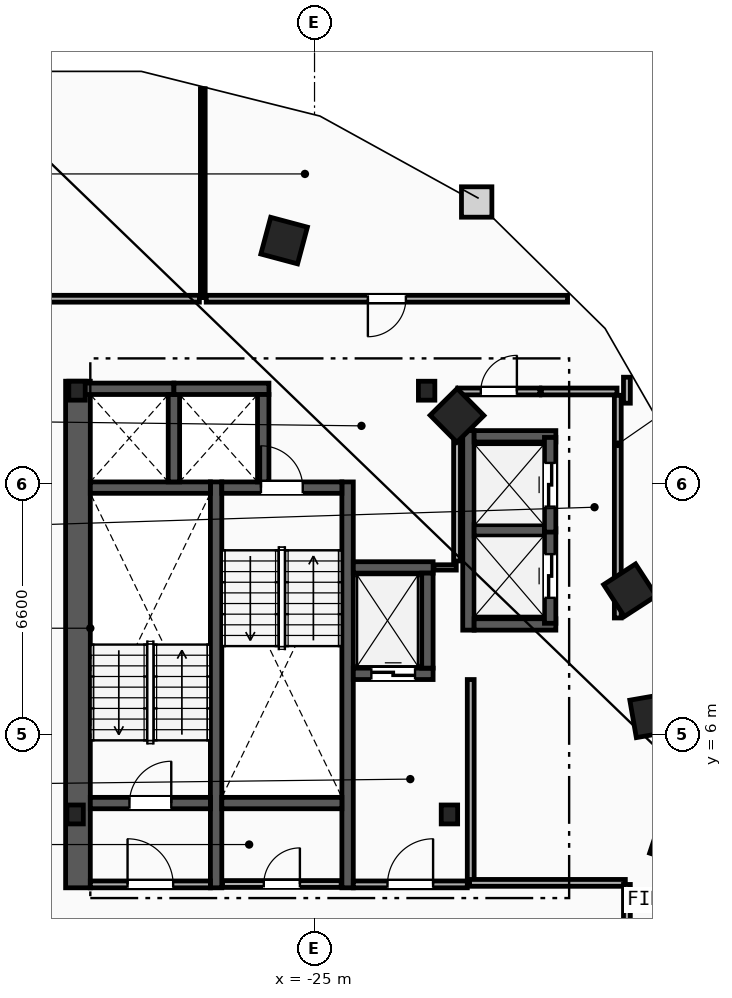
"""IFC4 building model, lengths in metres.
Left out: names, types, materials, properties, quantities, classifications, styles, units other than length and angle.
Written with IfcOpenShell. Run it as: python <this file> out.ifc"""

import sys

from ifc_helpers import new_model, si_unit, direction, frame, frame_2d, origin, origin_2d, place, context, subcontext, project, spatial, rectangle, i_section, extrude, element, fill, save


model = new_model("IFC4")
c1 = context("Model", 3, precision=1e-05, world=origin(), true_north=direction((0.0, 1.0)))
c2 = subcontext(c1, "Body", "Model", "MODEL_VIEW")
j1 = project(units=[si_unit("LENGTHUNIT", "METRE"), si_unit("PLANEANGLEUNIT", "RADIAN")], contexts=[c1])
p1 = place(None, origin())
s1 = spatial("IfcSite", under=j1, at=p1, CompositionType="ELEMENT")
p2 = place(p1, origin())
s2 = spatial("IfcBuilding", under=s1, at=p2, CompositionType="ELEMENT")
p3 = place(p2, frame((0.0, 0.0, 180.0)))
s3 = spatial("IfcBuildingStorey", under=s2, at=p3, CompositionType="ELEMENT", Elevation=180.0)
for number, where, z_axis, x_axis in (
    (1, (-31.3, 3.9, 0.0), (0.0, 0.0, 1.0), (1.0, 0.0, 0.0)),
    (2, (-21.45, 3.9, 0.0), (0.0, 0.0, 1.0), (1.0, 0.0, 0.0)),
    (3, (-22.05, 15.05, 0.0), (0.0, 0.0, 1.0), (1.0, 0.0, 0.0)),
    (4, (-31.25, 15.05, 0.0), (0.0, 0.0, 1.0), (1.0, 0.0, 0.0)),
):
    element("IfcColumn", number, at=place(p3, frame(where, z_axis=z_axis, x_axis=x_axis)), inside=s3, PredefinedType="COLUMN", context=c2, shape_type="SweptSolid", body=[
        extrude(i_section(OverallWidth=0.432, OverallDepth=0.498, WebThickness=0.056, FlangeThickness=0.089, FilletRadius=0.018, at=origin_2d()), origin(), (0.0, 0.0, 1.0), 3.6),
    ])
for number, where, z_axis, x_axis in (
    (5, (-15.55, 3.2, 0.0), (0.0, 0.0, 1.0), (0.315, 0.949, 0.0)),
    (6, (-16.125, 6.5, 0.0), (0.0, 0.0, 1.0), (-0.172, 0.985, 0.0)),
    (7, (-16.7, 9.8, 0.0), (0.0, 0.0, 1.0), (-0.544, 0.839, 0.0)),
    (8, (-21.25, 14.4, 0.0), (0.0, 0.0, 1.0), (-0.703, 0.711, 0.0)),
    (9, (-25.8, 19.0, 0.0), (0.0, 0.0, 1.0), (-0.966, 0.259, 0.0)),
):
    element("IfcColumn", number, at=place(p3, frame(where, z_axis=z_axis, x_axis=x_axis)), inside=s3, PredefinedType="COLUMN", context=c2, shape_type="SweptSolid", body=[
        extrude(rectangle(XDim=1.0, YDim=1.0, at=origin_2d()), origin(), (0.0, 0.0, 1.0), 3.6),
    ])
p4 = place(p3, frame((-31.225, 1.97, 0.0), z_axis=(0.0, 0.0, 1.0), x_axis=(0.0, 1.0, 0.0)))
e10 = element("IfcWall", 10, at=p4, inside=s3, PredefinedType="SHEAR", context=c2, shape_type="SweptSolid", body=[
    extrude(rectangle(XDim=13.33, YDim=0.65, at=frame_2d((6.665, 0.0))), origin(), (0.0, 0.0, 1.0), 3.36),
])
for number, where, z_axis, x_axis in (
    (11, (-27.59, 1.97, 0.0), (0.0, 0.0, 1.0), (0.0, 1.0, 0.0)),
    (12, (-24.13, 1.97, 0.0), (0.0, 0.0, 1.0), (0.0, 1.0, 0.0)),
):
    element("IfcWall", number, at=place(p3, frame(where, z_axis=z_axis, x_axis=x_axis)), inside=s3, PredefinedType="SHEAR", context=c2, shape_type="SweptSolid", body=[
        extrude(rectangle(XDim=10.68, YDim=0.3, at=frame_2d((5.34, 0.0))), origin(), (0.0, 0.0, 1.0), 3.36),
    ])
p5 = place(p3, frame((-30.9, 4.2, 0.0), z_axis=(0.0, 0.0, 1.0), x_axis=(1.0, 0.0, 0.0)))
e13 = element("IfcWall", 13, at=p5, inside=s3, PredefinedType="SHEAR", context=c2, shape_type="SweptSolid", body=[
    extrude(rectangle(XDim=3.16, YDim=0.3, at=frame_2d((1.58, 0.0))), origin(), (0.0, 0.0, 1.0), 3.36),
])
p6 = place(p5, frame((1.03, 0.0, 0.0)))
e14 = element("IfcOpeningElement", 14, at=p6, cuts=e13, PredefinedType="OPENING", context=c2, shape_type="SweptSolid", body=[
    extrude(rectangle(XDim=1.1, YDim=2.15, at=frame_2d((0.55, 1.075))), frame((0.0, 0.16, 0.0), z_axis=(0.0, -1.0, 0.0), x_axis=(1.0, 0.0, 0.0)), (0.0, 0.0, 1.0), 0.32),
])
p7 = place(p3, frame((-30.9, 12.5, 0.0), z_axis=(0.0, 0.0, 1.0), x_axis=(1.0, 0.0, 0.0)))
e15 = element("IfcWall", 15, at=p7, inside=s3, PredefinedType="SHEAR", context=c2, shape_type="SweptSolid", body=[
    extrude(rectangle(XDim=3.16, YDim=0.3, at=frame_2d((1.58, 0.0))), origin(), (0.0, 0.0, 1.0), 3.36),
])
p8 = place(p3, frame((-27.44, 12.5, 0.0), z_axis=(0.0, 0.0, 1.0), x_axis=(1.0, 0.0, 0.0)))
e16 = element("IfcWall", 16, at=p8, inside=s3, PredefinedType="SHEAR", context=c2, shape_type="SweptSolid", body=[
    extrude(rectangle(XDim=3.16, YDim=0.3, at=frame_2d((1.58, 0.0))), origin(), (0.0, 0.0, 1.0), 3.36),
])
p9 = place(p8, frame((1.03, 0.0, 0.0)))
e17 = element("IfcOpeningElement", 17, at=p9, cuts=e16, PredefinedType="OPENING", context=c2, shape_type="SweptSolid", body=[
    extrude(rectangle(XDim=1.1, YDim=2.15, at=frame_2d((0.55, 1.075))), frame((0.0, 0.16, 0.0), z_axis=(0.0, -1.0, 0.0), x_axis=(1.0, 0.0, 0.0)), (0.0, 0.0, 1.0), 0.32),
])
p10 = place(p3, frame((-27.44, 4.2, 0.0), z_axis=(0.0, 0.0, 1.0), x_axis=(1.0, 0.0, 0.0)))
e18 = element("IfcWall", 18, at=p10, inside=s3, PredefinedType="SHEAR", context=c2, shape_type="SweptSolid", body=[
    extrude(rectangle(XDim=3.16, YDim=0.3, at=frame_2d((1.58, 0.0))), origin(), (0.0, 0.0, 1.0), 3.36),
])
p11 = place(p3, frame((-20.89, 2.15, 0.0), z_axis=(0.0, 0.0, 1.0), x_axis=(0.0, 1.0, 0.0)))
e19 = element("IfcWall", 19, at=p11, inside=s3, PredefinedType="PARTITIONING", context=c2, shape_type="SweptSolid", body=[
    extrude(rectangle(XDim=5.3, YDim=0.18, at=frame_2d((2.65, 0.0))), origin(), (0.0, 0.0, 1.0), 3.36),
])
p12 = place(p3, frame((-23.98, 2.06, 0.0), z_axis=(0.0, 0.0, 1.0), x_axis=(1.0, 0.0, 0.0)))
e20 = element("IfcWall", 20, at=p12, inside=s3, PredefinedType="PARTITIONING", context=c2, shape_type="SweptSolid", body=[
    extrude(rectangle(XDim=3.0, YDim=0.18, at=frame_2d((1.5, 0.0))), origin(), (0.0, 0.0, 1.0), 3.36),
])
p13 = place(p12, frame((0.9, 0.0, 0.0)))
e21 = element("IfcOpeningElement", 21, at=p13, cuts=e20, PredefinedType="OPENING", context=c2, shape_type="SweptSolid", body=[
    extrude(rectangle(XDim=1.2, YDim=2.15, at=frame_2d((0.6, 1.075))), frame((0.0, 0.1, 0.0), z_axis=(0.0, -1.0, 0.0), x_axis=(1.0, 0.0, 0.0)), (0.0, 0.0, 1.0), 0.2),
])
p14 = place(p3, frame((-30.9, 2.06, 0.0), z_axis=(0.0, 0.0, 1.0), x_axis=(1.0, 0.0, 0.0)))
e22 = element("IfcWall", 22, at=p14, inside=s3, PredefinedType="PARTITIONING", context=c2, shape_type="SweptSolid", body=[
    extrude(rectangle(XDim=3.16, YDim=0.18, at=frame_2d((1.58, 0.0))), origin(), (0.0, 0.0, 1.0), 3.36),
])
p15 = place(p14, frame((0.98, 0.0, 0.0)))
e23 = element("IfcOpeningElement", 23, at=p15, cuts=e22, PredefinedType="OPENING", context=c2, shape_type="SweptSolid", body=[
    extrude(rectangle(XDim=1.2, YDim=2.15, at=frame_2d((0.6, 1.075))), frame((0.0, 0.1, 0.0), z_axis=(0.0, -1.0, 0.0), x_axis=(1.0, 0.0, 0.0)), (0.0, 0.0, 1.0), 0.2),
])
p16 = place(p3, frame((-23.98, 7.6, 0.0), z_axis=(0.0, 0.0, 1.0), x_axis=(1.0, 0.0, 0.0)))
e24 = element("IfcWall", 24, at=p16, inside=s3, PredefinedType="SHEAR", context=c2, shape_type="SweptSolid", body=[
    extrude(rectangle(XDim=2.1, YDim=0.3, at=frame_2d((1.05, 0.0))), origin(), (0.0, 0.0, 1.0), 3.36),
])
p17 = place(p16, frame((0.475, 0.0, 0.0)))
e25 = element("IfcOpeningElement", 25, at=p17, cuts=e24, PredefinedType="OPENING", context=c2, shape_type="SweptSolid", body=[
    extrude(rectangle(XDim=1.15, YDim=2.2, at=frame_2d((0.575, 1.1))), frame((0.0, 0.16, 0.0), z_axis=(0.0, -1.0, 0.0), x_axis=(1.0, 0.0, 0.0)), (0.0, 0.0, 1.0), 0.32),
])
p18 = place(p3, frame((-23.98, 10.4, 0.0), z_axis=(0.0, 0.0, 1.0), x_axis=(1.0, 0.0, 0.0)))
e26 = element("IfcWall", 26, at=p18, inside=s3, PredefinedType="SHEAR", context=c2, shape_type="SweptSolid", body=[
    extrude(rectangle(XDim=2.1, YDim=0.3, at=frame_2d((1.05, 0.0))), origin(), (0.0, 0.0, 1.0), 3.36),
])
for number, where, z_axis, x_axis in (
    (27, (-22.03, 7.75, 0.0), (0.0, 0.0, 1.0), (0.0, 1.0, 0.0)),
    (28, (-31.2, 15.1, 0.0), (0.0, 0.0, 1.0), (1.0, 0.0, 0.0)),
):
    element("IfcWall", number, at=place(p3, frame(where, z_axis=z_axis, x_axis=x_axis)), inside=s3, PredefinedType="SHEAR", context=c2, shape_type="SweptSolid", body=[
        extrude(rectangle(XDim=2.5, YDim=0.3, at=frame_2d((1.25, 0.0))), origin(), (0.0, 0.0, 1.0), 3.36),
    ])
p19 = place(p3, frame((-28.7, 12.65, 0.0), z_axis=(0.0, 0.0, 1.0), x_axis=(0.0, 1.0, 0.0)))
e29 = element("IfcWall", 29, at=p19, inside=s3, PredefinedType="SHEAR", context=c2, shape_type="SweptSolid", body=[
    extrude(rectangle(XDim=2.3, YDim=0.3, at=frame_2d((1.15, 0.0))), origin(), (0.0, 0.0, 1.0), 3.36),
])
p20 = place(p3, frame((-28.7, 15.1, 0.0), z_axis=(0.0, 0.0, 1.0), x_axis=(1.0, 0.0, 0.0)))
e30 = element("IfcWall", 30, at=p20, inside=s3, PredefinedType="SHEAR", context=c2, shape_type="SweptSolid", body=[
    extrude(rectangle(XDim=2.5, YDim=0.3, at=frame_2d((1.25, 0.0))), origin(), (0.0, 0.0, 1.0), 3.36),
])
p21 = place(p3, frame((-26.35, 12.65, 0.0), z_axis=(0.0, 0.0, 1.0), x_axis=(0.0, 1.0, 0.0)))
e31 = element("IfcWall", 31, at=p21, inside=s3, PredefinedType="SHEAR", context=c2, shape_type="SweptSolid", body=[
    extrude(rectangle(XDim=2.3, YDim=0.3, at=frame_2d((1.15, 0.0))), origin(), (0.0, 0.0, 1.0), 3.36),
])
p22 = place(p3, frame((-20.95, 8.75, 0.0), z_axis=(0.0, 0.0, 1.0), x_axis=(0.0, 1.0, 0.0)))
e32 = element("IfcWall", 32, at=p22, inside=s3, PredefinedType="SHEAR", context=c2, shape_type="SweptSolid", body=[
    extrude(rectangle(XDim=5.25, YDim=0.3, at=frame_2d((2.625, 0.0))), origin(), (0.0, 0.0, 1.0), 3.36),
])
for number, where, z_axis, x_axis in (
    (33, (-20.8, 8.9, 0.0), (0.0, 0.0, 1.0), (1.0, 0.0, 0.0)),
    (34, (-20.8, 13.85, 0.0), (0.0, 0.0, 1.0), (1.0, 0.0, 0.0)),
):
    element("IfcWall", number, at=place(p3, frame(where, z_axis=z_axis, x_axis=x_axis)), inside=s3, PredefinedType="SHEAR", context=c2, shape_type="SweptSolid", body=[
        extrude(rectangle(XDim=2.15, YDim=0.3, at=frame_2d((1.075, 0.0))), origin(), (0.0, 0.0, 1.0), 3.36),
    ])
p23 = place(p3, frame((-20.8, 11.375, 0.0), z_axis=(0.0, 0.0, 1.0), x_axis=(1.0, 0.0, 0.0)))
e35 = element("IfcWall", 35, at=p23, inside=s3, PredefinedType="SHEAR", context=c2, shape_type="SweptSolid", body=[
    extrude(rectangle(XDim=1.85, YDim=0.3, at=frame_2d((0.925, 0.0))), origin(), (0.0, 0.0, 1.0), 3.36),
])
p24 = place(p3, frame((-18.8, 8.93, 0.0), z_axis=(0.0, 0.0, 1.0), x_axis=(0.0, 1.0, 0.0)))
e36 = element("IfcWall", 36, at=p24, inside=s3, PredefinedType="SHEAR", context=c2, shape_type="SweptSolid", body=[
    extrude(rectangle(XDim=2.49, YDim=0.3, at=frame_2d((1.245, 0.0))), origin(), (0.0, 0.0, 1.0), 3.36),
])
p25 = place(p24, frame((0.67, 0.0, 0.0)))
e37 = element("IfcOpeningElement", 37, at=p25, cuts=e36, PredefinedType="OPENING", context=c2, shape_type="SweptSolid", body=[
    extrude(rectangle(XDim=1.15, YDim=2.2, at=frame_2d((0.575, 1.1))), frame((0.0, 0.16, 0.0), z_axis=(0.0, -1.0, 0.0), x_axis=(1.0, 0.0, 0.0)), (0.0, 0.0, 1.0), 0.32),
])
p26 = place(p3, frame((-18.8, 11.33, 0.0), z_axis=(0.0, 0.0, 1.0), x_axis=(0.0, 1.0, 0.0)))
e38 = element("IfcWall", 38, at=p26, inside=s3, PredefinedType="SHEAR", context=c2, shape_type="SweptSolid", body=[
    extrude(rectangle(XDim=2.49, YDim=0.3, at=frame_2d((1.245, 0.0))), origin(), (0.0, 0.0, 1.0), 3.36),
])
p27 = place(p26, frame((0.67, 0.0, 0.0)))
e39 = element("IfcOpeningElement", 39, at=p27, cuts=e38, PredefinedType="OPENING", context=c2, shape_type="SweptSolid", body=[
    extrude(rectangle(XDim=1.15, YDim=2.2, at=frame_2d((0.575, 1.1))), frame((0.0, 0.16, 0.0), z_axis=(0.0, -1.0, 0.0), x_axis=(1.0, 0.0, 0.0)), (0.0, 0.0, 1.0), 0.32),
])
p28 = place(p3, frame((-17.02, 9.07, 0.0), z_axis=(0.0, 0.0, 1.0), x_axis=(0.0, 1.0, 0.0)))
e40 = element("IfcWall", 40, at=p28, inside=s3, PredefinedType="PARTITIONING", context=c2, shape_type="SweptSolid", body=[
    extrude(rectangle(XDim=5.86, YDim=0.18, at=frame_2d((2.93, 0.0))), origin(), (0.0, 0.0, 1.0), 3.36),
])
p29 = place(p3, frame((-21.23, 15.03, 0.0), z_axis=(0.0, 0.0, 1.0), x_axis=(1.0, 0.0, 0.0)))
e41 = element("IfcWall", 41, at=p29, inside=s3, PredefinedType="PARTITIONING", context=c2, shape_type="SweptSolid", body=[
    extrude(rectangle(XDim=2.16, YDim=0.18, at=frame_2d((1.08, 0.0))), origin(), (0.0, 0.0, 1.0), 3.36),
])
p30 = place(p29, frame((0.605, 0.0, 0.0)))
e42 = element("IfcOpeningElement", 42, at=p30, cuts=e41, PredefinedType="OPENING", context=c2, shape_type="SweptSolid", body=[
    extrude(rectangle(XDim=0.95, YDim=2.1, at=frame_2d((0.475, 1.05))), frame((0.0, 0.1, 0.0), z_axis=(0.0, -1.0, 0.0), x_axis=(1.0, 0.0, 0.0)), (0.0, 0.0, 1.0), 0.2),
])
p31 = place(p3, frame((-19.03, 15.03, 0.0), z_axis=(0.0, 0.0, 1.0), x_axis=(1.0, 0.0, 0.0)))
e43 = element("IfcWall", 43, at=p31, inside=s3, PredefinedType="PARTITIONING", context=c2, shape_type="SweptSolid", body=[
    extrude(rectangle(XDim=1.99, YDim=0.18, at=frame_2d((0.995, 0.0))), origin(), (0.0, 0.0, 1.0), 3.36),
])
p32 = place(p3, frame((-21.86, 10.4, 0.0), z_axis=(0.0, 0.0, 1.0), x_axis=(1.0, 0.0, 0.0)))
e44 = element("IfcWall", 44, at=p32, inside=s3, PredefinedType="PARTITIONING", context=c2, shape_type="SweptSolid", body=[
    extrude(rectangle(XDim=0.59, YDim=0.14, at=frame_2d((0.295, 0.0))), origin(), (0.0, 0.0, 1.0), 3.36),
])
p33 = place(p3, frame((-21.25, 10.57, 0.0), z_axis=(0.0, 0.0, 1.0), x_axis=(0.0, 1.0, 0.0)))
e45 = element("IfcWall", 45, at=p33, inside=s3, PredefinedType="PARTITIONING", context=c2, shape_type="SweptSolid", body=[
    extrude(rectangle(XDim=4.36, YDim=0.18, at=frame_2d((2.18, 0.0))), origin(), (0.0, 0.0, 1.0), 3.36),
])
p34 = place(p3, frame((-27.42, 2.07, 0.0), z_axis=(0.0, 0.0, 1.0), x_axis=(1.0, 0.0, 0.0)))
e46 = element("IfcWall", 46, at=p34, inside=s3, PredefinedType="PARTITIONING", context=c2, shape_type="SweptSolid", body=[
    extrude(rectangle(XDim=3.12, YDim=0.18, at=frame_2d((1.56, 0.0))), origin(), (0.0, 0.0, 1.0), 3.36),
])
p35 = place(p34, frame((1.085, 0.0, 0.0)))
e47 = element("IfcOpeningElement", 47, at=p35, cuts=e46, PredefinedType="OPENING", context=c2, shape_type="SweptSolid", body=[
    extrude(rectangle(XDim=0.95, YDim=2.1, at=frame_2d((0.475, 1.05))), frame((0.0, 0.1, 0.0), z_axis=(0.0, -1.0, 0.0), x_axis=(1.0, 0.0, 0.0)), (0.0, 0.0, 1.0), 0.2),
])
p36 = place(p3, frame((-27.94, 17.5, 0.0), z_axis=(0.0, 0.0, 1.0), x_axis=(0.0, 1.0, 0.0)))
e48 = element("IfcWall", 48, at=p36, inside=s3, PredefinedType="PARTITIONING", context=c2, shape_type="SweptSolid", body=[
    extrude(rectangle(XDim=5.497, YDim=0.125, at=frame_2d((2.748, 0.0))), origin(), (0.0, 0.0, 1.0), 3.36),
])
p37 = place(p3, frame((-28.03, 17.47, 0.0), z_axis=(0.0, 0.0, 1.0), x_axis=(-1.0, 0.0, 0.0)))
e49 = element("IfcWall", 49, at=p37, inside=s3, PredefinedType="PARTITIONING", context=c2, shape_type="SweptSolid", body=[
    extrude(rectangle(XDim=5.598, YDim=0.18, at=frame_2d((2.799, 0.0))), origin(), (0.0, 0.0, 1.0), 3.36),
])
p38 = place(p3, frame((-16.822, 2.1, 0.0), z_axis=(0.0, 0.0, 1.0), x_axis=(-1.0, 0.0, 0.0)))
e50 = element("IfcWall", 50, at=p38, inside=s3, PredefinedType="PARTITIONING", context=c2, shape_type="SweptSolid", body=[
    extrude(rectangle(XDim=4.098, YDim=0.18, at=frame_2d((2.049, 0.0))), origin(), (0.0, 0.0, 1.0), 3.36),
])
p39 = place(p3, frame((-16.78, -0.329, 0.0), z_axis=(0.0, 0.0, 1.0), x_axis=(0.0, 1.0, 0.0)))
e51 = element("IfcWall", 51, at=p39, inside=s3, PredefinedType="PARTITIONING", context=c2, shape_type="SweptSolid", body=[
    extrude(rectangle(XDim=2.387, YDim=0.18, at=frame_2d((1.194, 0.0))), origin(), (0.0, 0.0, 1.0), 3.36),
])
p40 = place(p3, frame((-16.78, 14.721, 0.0), z_axis=(0.0, 0.0, 1.0), x_axis=(0.0, 1.0, 0.0)))
e52 = element("IfcWall", 52, at=p40, inside=s3, PredefinedType="PARTITIONING", context=c2, shape_type="SweptSolid", body=[
    extrude(rectangle(XDim=0.684, YDim=0.18, at=frame_2d((0.342, 0.0))), origin(), (0.0, 0.0, 1.0), 3.36),
])
p41 = place(p3, frame((-18.342, 17.47, 0.0), z_axis=(0.0, 0.0, 1.0), x_axis=(-1.0, 0.0, 0.0)))
e53 = element("IfcWall", 53, at=p41, inside=s3, PredefinedType="PARTITIONING", context=c2, shape_type="SweptSolid", body=[
    extrude(rectangle(XDim=9.508, YDim=0.18, at=frame_2d((4.754, 0.0))), origin(), (0.0, 0.0, 1.0), 3.36),
])
p42 = place(p41, frame((4.254, 0.0, 0.0)))
e54 = element("IfcOpeningElement", 54, at=p42, cuts=e53, PredefinedType="OPENING", context=c2, shape_type="SweptSolid", body=[
    extrude(rectangle(XDim=1.0, YDim=2.15, at=frame_2d((0.5, 1.075))), frame((0.0, 0.1, 0.0), z_axis=(0.0, -1.0, 0.0), x_axis=(1.0, 0.0, 0.0)), (0.0, 0.0, 1.0), 0.2),
])
p43 = place(p6, origin())
e55 = element("IfcDoor", 55, at=p43, inside=s3, OperationType="SINGLE_SWING_RIGHT", PredefinedType="DOOR", context=c2, shape_type="SweptSolid", body=[
    extrude(rectangle(XDim=1.1, YDim=2.15, at=frame_2d((0.55, 1.075))), frame((0.0, 0.025, 0.0), z_axis=(0.0, -1.0, 0.0), x_axis=(1.0, 0.0, 0.0)), (0.0, 0.0, 1.0), 0.05),
])
fill(e14, e55)
p44 = place(p9, origin())
e56 = element("IfcDoor", 56, at=p44, inside=s3, OperationType="SINGLE_SWING_LEFT", PredefinedType="DOOR", context=c2, shape_type="SweptSolid", body=[
    extrude(rectangle(XDim=1.1, YDim=2.15, at=frame_2d((0.55, 1.075))), frame((0.0, 0.025, 0.0), z_axis=(0.0, -1.0, 0.0), x_axis=(1.0, 0.0, 0.0)), (0.0, 0.0, 1.0), 0.05),
])
fill(e17, e56)
p45 = place(p13, origin())
e57 = element("IfcDoor", 57, at=p45, inside=s3, OperationType="SINGLE_SWING_RIGHT", PredefinedType="DOOR", context=c2, shape_type="SweptSolid", body=[
    extrude(rectangle(XDim=1.2, YDim=2.15, at=frame_2d((0.6, 1.075))), frame((0.0, 0.025, 0.0), z_axis=(0.0, -1.0, 0.0), x_axis=(1.0, 0.0, 0.0)), (0.0, 0.0, 1.0), 0.05),
])
fill(e21, e57)
p46 = place(p15, origin())
e58 = element("IfcDoor", 58, at=p46, inside=s3, OperationType="SINGLE_SWING_LEFT", PredefinedType="DOOR", context=c2, shape_type="SweptSolid", body=[
    extrude(rectangle(XDim=1.2, YDim=2.15, at=frame_2d((0.6, 1.075))), frame((0.0, 0.025, 0.0), z_axis=(0.0, -1.0, 0.0), x_axis=(1.0, 0.0, 0.0)), (0.0, 0.0, 1.0), 0.05),
])
fill(e23, e58)
p47 = place(p17, origin())
e59 = element("IfcDoor", 59, at=p47, inside=s3, OperationType="SLIDING_TO_LEFT", PredefinedType="TRAPDOOR", context=c2, shape_type="SweptSolid", body=[
    extrude(rectangle(XDim=1.15, YDim=2.2, at=frame_2d((0.575, 1.1))), frame((0.0, 0.025, 0.0), z_axis=(0.0, -1.0, 0.0), x_axis=(1.0, 0.0, 0.0)), (0.0, 0.0, 1.0), 0.05),
])
fill(e25, e59)
p48 = place(p25, origin())
e60 = element("IfcDoor", 60, at=p48, inside=s3, OperationType="SLIDING_TO_LEFT", PredefinedType="TRAPDOOR", context=c2, shape_type="SweptSolid", body=[
    extrude(rectangle(XDim=1.15, YDim=2.2, at=frame_2d((0.575, 1.1))), frame((0.0, 0.025, 0.0), z_axis=(0.0, -1.0, 0.0), x_axis=(1.0, 0.0, 0.0)), (0.0, 0.0, 1.0), 0.05),
])
fill(e37, e60)
p49 = place(p27, origin())
e61 = element("IfcDoor", 61, at=p49, inside=s3, OperationType="SLIDING_TO_LEFT", PredefinedType="TRAPDOOR", context=c2, shape_type="SweptSolid", body=[
    extrude(rectangle(XDim=1.15, YDim=2.2, at=frame_2d((0.575, 1.1))), frame((0.0, 0.025, 0.0), z_axis=(0.0, -1.0, 0.0), x_axis=(1.0, 0.0, 0.0)), (0.0, 0.0, 1.0), 0.05),
])
fill(e39, e61)
p50 = place(p42, origin())
e62 = element("IfcDoor", 62, at=p50, inside=s3, OperationType="SINGLE_SWING_RIGHT", PredefinedType="DOOR", context=c2, shape_type="SweptSolid", body=[
    extrude(rectangle(XDim=1.0, YDim=2.15, at=frame_2d((0.5, 1.075))), frame((0.0, 0.025, 0.0), z_axis=(0.0, -1.0, 0.0), x_axis=(1.0, 0.0, 0.0)), (0.0, 0.0, 1.0), 0.05),
])
fill(e54, e62)
p51 = place(p35, origin())
e63 = element("IfcDoor", 63, at=p51, inside=s3, OperationType="SINGLE_SWING_RIGHT", PredefinedType="DOOR", context=c2, shape_type="SweptSolid", body=[
    extrude(rectangle(XDim=0.95, YDim=2.1, at=frame_2d((0.475, 1.05))), frame((0.0, 0.025, 0.0), z_axis=(0.0, -1.0, 0.0), x_axis=(1.0, 0.0, 0.0)), (0.0, 0.0, 1.0), 0.05),
])
fill(e47, e63)
p52 = place(p30, origin())
e64 = element("IfcDoor", 64, at=p52, inside=s3, OperationType="SINGLE_SWING_RIGHT", PredefinedType="DOOR", context=c2, shape_type="SweptSolid", body=[
    extrude(rectangle(XDim=0.95, YDim=2.1, at=frame_2d((0.475, 1.05))), frame((0.0, 0.025, 0.0), z_axis=(0.0, -1.0, 0.0), x_axis=(1.0, 0.0, 0.0)), (0.0, 0.0, 1.0), 0.05),
])
fill(e42, e64)
save(model, sys.argv[1])
